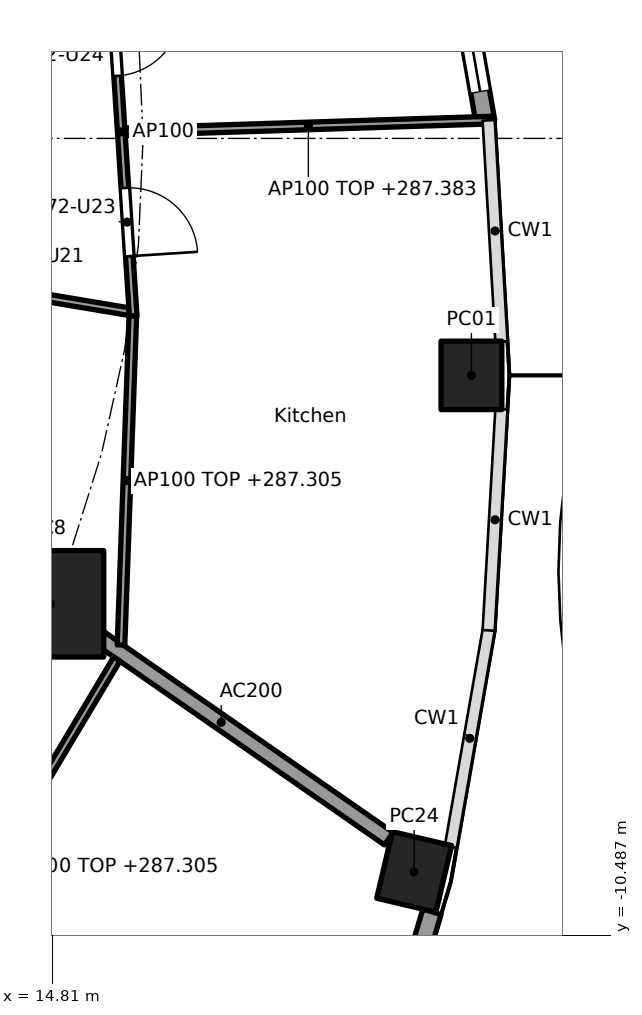
"""IFC4 building model, lengths in metres.
Left out: names, types, materials, properties, quantities, classifications, styles, units other than length and angle.
Written with IfcOpenShell. Run it as: python <this file> out.ifc"""

import sys

from ifc_helpers import new_model, si_unit, direction, frame, frame_2d, origin, origin_2d, place, context, subcontext, project, spatial, rectangle, hollow_rectangle, extrude, element, fill, save


model = new_model("IFC4")
c1 = context("Model", 3, precision=1e-05, world=origin(), true_north=direction((0.0, 1.0)))
c2 = subcontext(c1, "Body", "Model", "MODEL_VIEW")
j1 = project(units=[si_unit("LENGTHUNIT", "METRE"), si_unit("PLANEANGLEUNIT", "RADIAN")], contexts=[c1])
p1 = place(None, origin())
s1 = spatial("IfcSite", under=j1, at=p1, CompositionType="ELEMENT")
p2 = place(p1, origin())
s2 = spatial("IfcBuilding", under=s1, at=p2, CompositionType="ELEMENT")
p3 = place(p2, frame((0.0, 0.0, 284.4)))
s3 = spatial("IfcBuildingStorey", under=s2, at=p3, CompositionType="ELEMENT", Elevation=284.4)
for number, where, z_axis, x_axis in (
    (1, (20.32, -3.118, 0.0), (0.0, 0.0, 1.0), (0.0, 1.0, 0.0)),
    (2, (19.566, -9.65, 0.0), (0.0, 0.0, 1.0), (0.229, 0.973, 0.0)),
):
    element("IfcColumn", number, at=place(p3, frame(where, z_axis=z_axis, x_axis=x_axis)), inside=s3, PredefinedType="COLUMN", context=c2, shape_type="SweptSolid", body=[
        extrude(hollow_rectangle(XDim=0.9, YDim=0.8, WallThickness=0.028, at=origin_2d()), origin(), (0.0, 0.0, 1.0), 3.7),
    ])
p4 = place(p3, frame((14.782, -6.123, 0.0), z_axis=(0.0, 0.0, 1.0), x_axis=(1.0, 0.0, 0.0)))
e3 = element("IfcColumn", 3, at=p4, inside=s3, PredefinedType="COLUMN", context=c2, shape_type="SweptSolid", body=[
    extrude(rectangle(XDim=1.4, YDim=1.4, at=origin_2d()), origin(), (0.0, 0.0, 1.0), 3.7),
])
p5 = place(p3, frame((20.004, 3.08, 0.0), z_axis=(0.0, 0.0, 1.0), x_axis=(0.172182411767, -0.985065082661, 0.0)))
e4 = element("IfcWall", 4, at=p5, inside=s3, PredefinedType="SOLIDWALL", context=c2, shape_type="SweptSolid", body=[
    extrude(rectangle(XDim=2.903, YDim=0.25, at=frame_2d((1.451, 0.0))), origin(), (0.0, 0.0, 1.0), 3.44),
])
p6 = place(p5, frame((0.401, 0.0, 0.0)))
e5 = element("IfcOpeningElement", 5, at=p6, cuts=e4, PredefinedType="OPENING", context=c2, shape_type="SweptSolid", body=[
    extrude(rectangle(XDim=2.1, YDim=2.4, at=frame_2d((1.05, 1.2))), frame((0.0, 0.135, 0.0), z_axis=(0.0, -1.0, 0.0), x_axis=(1.0, 0.0, 0.0)), (0.0, 0.0, 1.0), 0.27),
])
p7 = place(p3, frame((19.801, -10.175, 0.0), z_axis=(0.0, 0.0, 1.0), x_axis=(-0.285899456462, -0.958259620768, 0.0)))
e6 = element("IfcWall", 6, at=p7, inside=s3, PredefinedType="SOLIDWALL", context=c2, shape_type="SweptSolid", body=[
    extrude(rectangle(XDim=2.877, YDim=0.25, at=frame_2d((1.438, 0.0))), origin(), (0.0, 0.0, 1.0), 3.44),
])
p8 = place(p7, frame((0.389, 0.0, 0.0)))
e7 = element("IfcOpeningElement", 7, at=p8, cuts=e6, PredefinedType="OPENING", context=c2, shape_type="SweptSolid", body=[
    extrude(rectangle(XDim=2.1, YDim=2.4, at=frame_2d((1.05, 1.2))), frame((0.0, 0.135, 0.0), z_axis=(0.0, -1.0, 0.0), x_axis=(1.0, 0.0, 0.0)), (0.0, 0.0, 1.0), 0.27),
])
p9 = place(p3, frame((14.823, -6.151, 0.0), z_axis=(0.0, 0.0, 1.0), x_axis=(0.821435065081, -0.570302054928, 0.0)))
e8 = element("IfcWall", 8, at=p9, inside=s3, PredefinedType="PARTITIONING", context=c2, shape_type="SweptSolid", body=[
    extrude(rectangle(XDim=5.368, YDim=0.2, at=frame_2d((2.684, 0.0))), origin(), (0.0, 0.0, 1.0), 3.44),
])
p10 = place(p3, frame((12.663, -1.751, 0.0), z_axis=(0.0, 0.0, 1.0), x_axis=(0.98626156497, -0.165191178529, 0.0)))
e9 = element("IfcWall", 9, at=p10, inside=s3, PredefinedType="PARTITIONING", context=c2, shape_type="SweptSolid", body=[
    extrude(rectangle(XDim=3.198, YDim=0.1, at=frame_2d((1.599, 0.0))), origin(), (0.0, 0.0, 1.0), 2.762),
])
p11 = place(p10, frame((1.149, 0.0, 0.0)))
e10 = element("IfcOpeningElement", 10, at=p11, cuts=e9, PredefinedType="OPENING", context=c2, shape_type="SweptSolid", body=[
    extrude(rectangle(XDim=0.9, YDim=2.1, at=frame_2d((0.45, 1.05))), frame((0.0, 0.06, 0.0), z_axis=(0.0, -1.0, 0.0), x_axis=(1.0, 0.0, 0.0)), (0.0, 0.0, 1.0), 0.12),
])
p12 = place(p3, frame((15.87, -2.338, 0.0), z_axis=(0.0, 0.0, 1.0), x_axis=(-0.064797294757, 0.997898447034, 0.0)))
e11 = element("IfcWall", 11, at=p12, inside=s3, PredefinedType="PARTITIONING", context=c2, shape_type="SweptSolid", body=[
    extrude(rectangle(XDim=4.857, YDim=0.1, at=frame_2d((2.428, 0.0))), origin(), (0.0, 0.0, 1.0), 3.44),
])
p13 = place(p12, frame((0.789, 0.0, 0.0)))
e12 = element("IfcOpeningElement", 12, at=p13, cuts=e11, PredefinedType="OPENING", context=c2, shape_type="SweptSolid", body=[
    extrude(rectangle(XDim=0.9, YDim=2.1, at=frame_2d((0.45, 1.05))), frame((0.0, 0.06, 0.0), z_axis=(0.0, -1.0, 0.0), x_axis=(1.0, 0.0, 0.0)), (0.0, 0.0, 1.0), 0.12),
])
p14 = place(p12, frame((3.167, 0.0, 0.0)))
e13 = element("IfcOpeningElement", 13, at=p14, cuts=e11, PredefinedType="OPENING", context=c2, shape_type="SweptSolid", body=[
    extrude(rectangle(XDim=0.9, YDim=2.1, at=frame_2d((0.45, 1.05))), frame((0.0, 0.06, 0.0), z_axis=(0.0, -1.0, 0.0), x_axis=(1.0, 0.0, 0.0)), (0.0, 0.0, 1.0), 0.12),
])
p15 = place(p3, frame((15.865, -2.338, 0.0), z_axis=(0.0, 0.0, 1.0), x_axis=(-0.035864509465, -0.999356661538, 0.0)))
e14 = element("IfcWall", 14, at=p15, inside=s3, PredefinedType="PARTITIONING", context=c2, shape_type="SweptSolid", body=[
    extrude(rectangle(XDim=4.329, YDim=0.1, at=frame_2d((2.165, 0.0))), origin(), (0.0, 0.0, 1.0), 2.905),
])
p16 = place(p3, frame((15.763, 0.087, 0.0), z_axis=(0.0, 0.0, 1.0), x_axis=(0.999492034598, 0.03186962151, 0.0)))
e15 = element("IfcWall", 15, at=p16, inside=s3, PredefinedType="PARTITIONING", context=c2, shape_type="SweptSolid", body=[
    extrude(rectangle(XDim=4.826, YDim=0.1, at=frame_2d((2.413, 0.0))), origin(), (0.0, 0.0, 1.0), 2.983),
])
p17 = place(p3, frame((10.179, -7.731, 0.0), z_axis=(0.0, 0.0, 1.0), x_axis=(0.67775318564, -0.73528947997, 0.0)))
e16 = element("IfcWall", 16, at=p17, inside=s3, PredefinedType="PARTITIONING", context=c2, shape_type="SweptSolid", body=[
    extrude(rectangle(XDim=10.222, YDim=0.1, at=frame_2d((5.111, 0.0))), origin(), (0.0, 0.0, 1.0), 2.762),
])
p18 = place(p17, frame((1.766, 0.0, 0.0)))
e17 = element("IfcOpeningElement", 17, at=p18, cuts=e16, PredefinedType="OPENING", context=c2, shape_type="SweptSolid", body=[
    extrude(rectangle(XDim=0.9, YDim=2.1, at=frame_2d((0.45, 1.05))), frame((0.0, 0.06, 0.0), z_axis=(0.0, -1.0, 0.0), x_axis=(1.0, 0.0, 0.0)), (0.0, 0.0, 1.0), 0.12),
])
p19 = place(p17, frame((6.877, 0.0, 0.0)))
e18 = element("IfcOpeningElement", 18, at=p19, cuts=e16, PredefinedType="OPENING", context=c2, shape_type="SweptSolid", body=[
    extrude(rectangle(XDim=0.9, YDim=2.1, at=frame_2d((0.45, 1.05))), frame((0.0, 0.06, 0.0), z_axis=(0.0, -1.0, 0.0), x_axis=(1.0, 0.0, 0.0)), (0.0, 0.0, 1.0), 0.12),
])
p20 = place(p3, frame((13.208, -10.947, 0.0), z_axis=(0.0, 0.0, 1.0), x_axis=(0.512726452516, 0.858552028063, 0.0)))
e19 = element("IfcWall", 19, at=p20, inside=s3, PredefinedType="PARTITIONING", context=c2, shape_type="SweptSolid", body=[
    extrude(rectangle(XDim=4.772, YDim=0.1, at=frame_2d((2.386, 0.0))), origin(), (0.0, 0.0, 1.0), 2.905),
])
p21 = place(p6, origin())
e20 = element("IfcDoor", 20, at=p21, inside=s3, OperationType="SLIDING_TO_LEFT", PredefinedType="DOOR", context=c2, shape_type="SweptSolid", body=[
    extrude(rectangle(XDim=2.1, YDim=2.4, at=frame_2d((1.05, 1.2))), frame((0.0, 0.025, 0.0), z_axis=(0.0, -1.0, 0.0), x_axis=(1.0, 0.0, 0.0)), (0.0, 0.0, 1.0), 0.05),
])
fill(e5, e20)
p22 = place(p13, frame((0.9, 0.0, 0.0), x_axis=(-1.0, 0.0, 0.0)))
e21 = element("IfcDoor", 21, at=p22, inside=s3, OperationType="SINGLE_SWING_RIGHT", PredefinedType="DOOR", context=c2, shape_type="SweptSolid", body=[
    extrude(rectangle(XDim=0.9, YDim=2.1, at=frame_2d((0.45, 1.05))), frame((0.0, 0.025, 0.0), z_axis=(0.0, -1.0, 0.0), x_axis=(1.0, 0.0, 0.0)), (0.0, 0.0, 1.0), 0.05),
])
fill(e12, e21)
p23 = place(p14, frame((0.9, 0.0, 0.0), x_axis=(-1.0, 0.0, 0.0)))
e22 = element("IfcDoor", 22, at=p23, inside=s3, OperationType="SINGLE_SWING_LEFT", PredefinedType="DOOR", context=c2, shape_type="SweptSolid", body=[
    extrude(rectangle(XDim=0.9, YDim=2.1, at=frame_2d((0.45, 1.05))), frame((0.0, 0.025, 0.0), z_axis=(0.0, -1.0, 0.0), x_axis=(1.0, 0.0, 0.0)), (0.0, 0.0, 1.0), 0.05),
])
fill(e13, e22)
save(model, sys.argv[1])
